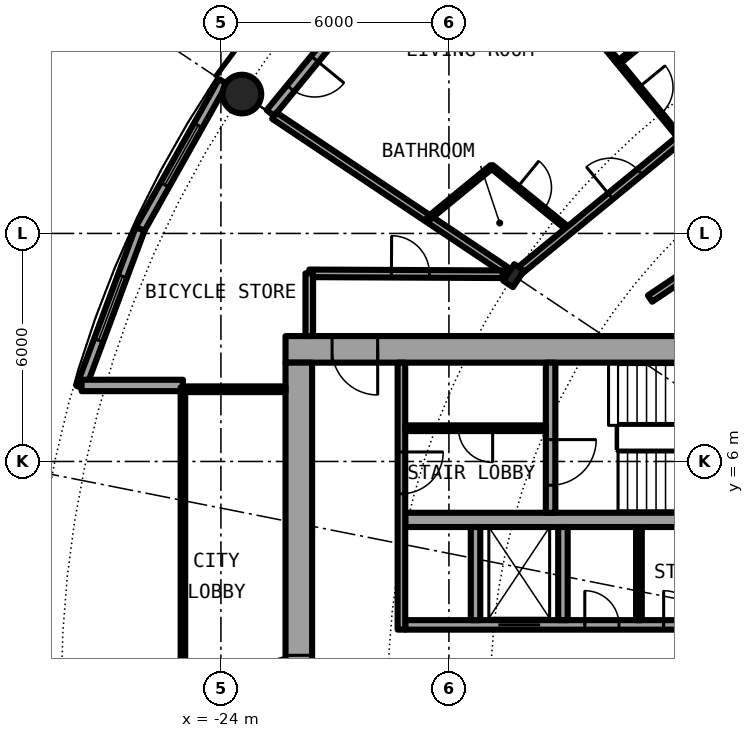
"""IFC4 building model, lengths in metres.
Left out: names, types, materials, properties, quantities, classifications, styles, units other than length and angle.
Written with IfcOpenShell. Run it as: python <this file> out.ifc"""

import sys

from ifc_helpers import new_model, si_unit, direction, frame, frame_2d, origin, origin_2d, place, context, subcontext, project, spatial, rectangle, hollow_circle, i_section, extrude, element, fill, save


model = new_model("IFC4")
c1 = context("Model", 3, precision=1e-05, world=origin(), true_north=direction((0.0, 1.0)))
c2 = subcontext(c1, "Body", "Model", "MODEL_VIEW")
j1 = project(units=[si_unit("LENGTHUNIT", "METRE"), si_unit("PLANEANGLEUNIT", "RADIAN")], contexts=[c1])
p1 = place(None, origin())
s1 = spatial("IfcSite", under=j1, at=p1, CompositionType="ELEMENT")
p2 = place(p1, origin())
s2 = spatial("IfcBuilding", under=s1, at=p2, CompositionType="ELEMENT")
p3 = place(p2, frame((0.0, 0.0, 91.05)))
s3 = spatial("IfcBuildingStorey", under=s2, at=p3, CompositionType="ELEMENT", Elevation=91.05)
p4 = place(p3, frame((-23.448, 15.667, 0.0), z_axis=(0.0, 0.0, 1.0), x_axis=(1.0, 0.0, 0.0)))
e1 = element("IfcColumn", 1, at=p4, inside=s3, PredefinedType="COLUMN", context=c2, shape_type="SweptSolid", body=[
    extrude(hollow_circle(Radius=0.508, WallThickness=0.04, at=origin_2d()), origin(), (0.0, 0.0, 1.0), 3.05),
])
p5 = place(p3, frame((-16.297, 10.889, 0.0), z_axis=(0.0, 0.0, 1.0), x_axis=(-0.831469612303, 0.55557023302, 0.0)))
e2 = element("IfcColumn", 2, at=p5, inside=s3, PredefinedType="COLUMN", context=c2, shape_type="SweptSolid", body=[
    extrude(i_section(OverallWidth=0.306, OverallDepth=0.524, WebThickness=0.021, FlangeThickness=0.04, FilletRadius=0.027, at=origin_2d()), origin(), (0.0, 0.0, 1.0), 3.05),
])
p6 = place(p3, frame((-19.304, 19.304, 0.0), z_axis=(0.0, 0.0, 1.0), x_axis=(-0.634382322723, -0.773019449054, 0.0)))
e3 = element("IfcWall", 3, at=p6, inside=s3, PredefinedType="SOLIDWALL", context=c2, shape_type="SweptSolid", body=[
    extrude(rectangle(XDim=5.352, YDim=0.25, at=frame_2d((2.676, 0.0))), origin(), (0.0, 0.0, 1.0), 2.7),
])
p7 = place(p6, frame((0.441, 0.0, 0.3)))
e4 = element("IfcOpeningElement", 4, at=p7, cuts=e3, PredefinedType="OPENING", context=c2, shape_type="SweptSolid", body=[
    extrude(rectangle(XDim=1.8, YDim=2.1, at=frame_2d((0.9, 1.05))), frame((0.0, 0.135, 0.0), z_axis=(0.0, -1.0, 0.0), x_axis=(1.0, 0.0, 0.0)), (0.0, 0.0, 1.0), 0.27),
])
p8 = place(p6, frame((3.51, 0.0, 0.0)))
e5 = element("IfcOpeningElement", 5, at=p8, cuts=e3, PredefinedType="OPENING", context=c2, shape_type="SweptSolid", body=[
    extrude(rectangle(XDim=1.0, YDim=2.2, at=frame_2d((0.5, 1.1))), frame((0.0, 0.135, 0.0), z_axis=(0.0, -1.0, 0.0), x_axis=(1.0, 0.0, 0.0)), (0.0, 0.0, 1.0), 0.27),
])
p9 = place(p3, frame((-23.946, 16.0, 0.0), z_axis=(0.0, 0.0, 1.0), x_axis=(-0.489696356642, -0.871893042919, 0.0)))
e6 = element("IfcWall", 6, at=p9, inside=s3, PredefinedType="SOLIDWALL", context=c2, shape_type="SweptSolid", body=[
    extrude(rectangle(XDim=4.454, YDim=0.25, at=frame_2d((2.227, 0.0))), origin(), (0.0, 0.0, 1.0), 2.7),
])
p10 = place(p9, frame((1.327, 0.0, 0.3)))
e7 = element("IfcOpeningElement", 7, at=p10, cuts=e6, PredefinedType="OPENING", context=c2, shape_type="SweptSolid", body=[
    extrude(rectangle(XDim=1.8, YDim=2.1, at=frame_2d((0.9, 1.05))), frame((0.0, 0.135, 0.0), z_axis=(0.0, -1.0, 0.0), x_axis=(1.0, 0.0, 0.0)), (0.0, 0.0, 1.0), 0.27),
])
p11 = place(p3, frame((-26.127, 12.117, 0.0), z_axis=(0.0, 0.0, 1.0), x_axis=(-0.349247811493, -0.937030397675, 0.0)))
e8 = element("IfcWall", 8, at=p11, inside=s3, PredefinedType="SOLIDWALL", context=c2, shape_type="SweptSolid", body=[
    extrude(rectangle(XDim=4.452, YDim=0.25, at=frame_2d((2.226, 0.0))), origin(), (0.0, 0.0, 1.0), 2.7),
])
p12 = place(p11, frame((1.327, 0.0, 0.3)))
e9 = element("IfcOpeningElement", 9, at=p12, cuts=e8, PredefinedType="OPENING", context=c2, shape_type="SweptSolid", body=[
    extrude(rectangle(XDim=1.8, YDim=2.1, at=frame_2d((0.9, 1.05))), frame((0.0, 0.135, 0.0), z_axis=(0.0, -1.0, 0.0), x_axis=(1.0, 0.0, 0.0)), (0.0, 0.0, 1.0), 0.27),
])
p13 = place(p3, frame((-25.0, 8.0, 0.0), z_axis=(0.0, 0.0, 1.0), x_axis=(-1.0, 0.0, 0.0)))
e10 = element("IfcWall", 10, at=p13, inside=s3, PredefinedType="SOLIDWALL", context=c2, shape_type="SweptSolid", body=[
    extrude(rectangle(XDim=2.667, YDim=0.3, at=frame_2d((1.333, 0.0))), origin(), (0.0, 0.0, 1.0), 2.7),
])
p14 = place(p3, frame((-8.3, 8.95, 0.0), z_axis=(0.0, 0.0, 1.0), x_axis=(-1.0, 0.0, 0.0)))
e11 = element("IfcWall", 11, at=p14, inside=s3, PredefinedType="SHEAR", context=c2, shape_type="SweptSolid", body=[
    extrude(rectangle(XDim=14.0, YDim=0.7, at=frame_2d((7.0, 0.0))), origin(), (0.0, 0.0, 1.0), 3.05),
])
p15 = place(p14, frame((11.575, 0.0, 0.0)))
e12 = element("IfcOpeningElement", 12, at=p15, cuts=e11, PredefinedType="OPENING", context=c2, shape_type="SweptSolid", body=[
    extrude(rectangle(XDim=1.2, YDim=2.3, at=frame_2d((0.6, 1.15))), frame((0.0, 0.36, 0.0), z_axis=(0.0, -1.0, 0.0), x_axis=(1.0, 0.0, 0.0)), (0.0, 0.0, 1.0), 0.72),
])
p16 = place(p3, frame((-21.95, -8.6, 0.0), z_axis=(0.0, 0.0, 1.0), x_axis=(0.0, 1.0, 0.0)))
e13 = element("IfcWall", 13, at=p16, inside=s3, PredefinedType="SHEAR", context=c2, shape_type="SweptSolid", body=[
    extrude(rectangle(XDim=17.2, YDim=0.7, at=frame_2d((8.6, 0.0))), origin(), (0.0, 0.0, 1.0), 3.05),
])
p17 = place(p16, frame((7.7, 0.0, 0.0)))
e14 = element("IfcOpeningElement", 14, at=p17, cuts=e13, PredefinedType="OPENING", context=c2, shape_type="SweptSolid", body=[
    extrude(rectangle(XDim=1.8, YDim=2.3, at=frame_2d((0.9, 1.15))), frame((0.0, 0.36, 0.0), z_axis=(0.0, -1.0, 0.0), x_axis=(1.0, 0.0, 0.0)), (0.0, 0.0, 1.0), 0.72),
])
p18 = place(p3, frame((-19.15, 1.7, 0.0), z_axis=(0.0, 0.0, 1.0), x_axis=(1.0, 0.0, 0.0)))
e15 = element("IfcWall", 15, at=p18, inside=s3, PredefinedType="SHEAR", context=c2, shape_type="SweptSolid", body=[
    extrude(rectangle(XDim=10.15, YDim=0.25, at=frame_2d((5.075, 0.0))), origin(), (0.0, 0.0, 1.0), 3.05),
])
p19 = place(p18, frame((2.45, 0.0, 0.0)))
e16 = element("IfcOpeningElement", 16, at=p19, cuts=e15, PredefinedType="OPENING", context=c2, shape_type="SweptSolid", body=[
    extrude(rectangle(XDim=1.1, YDim=2.3, at=frame_2d((0.55, 1.15))), frame((0.0, 0.135, 0.0), z_axis=(0.0, -1.0, 0.0), x_axis=(1.0, 0.0, 0.0)), (0.0, 0.0, 1.0), 0.27),
])
p20 = place(p18, frame((8.837, 0.0, 0.0)))
e17 = element("IfcOpeningElement", 17, at=p20, cuts=e15, PredefinedType="OPENING", context=c2, shape_type="SweptSolid", body=[
    extrude(rectangle(XDim=0.9, YDim=2.3, at=frame_2d((0.45, 1.15))), frame((0.0, 0.135, 0.0), z_axis=(0.0, -1.0, 0.0), x_axis=(1.0, 0.0, 0.0)), (0.0, 0.0, 1.0), 0.27),
])
p21 = place(p18, frame((6.8, 0.0, 0.0)))
e18 = element("IfcOpeningElement", 18, at=p21, cuts=e15, PredefinedType="OPENING", context=c2, shape_type="SweptSolid", body=[
    extrude(rectangle(XDim=0.9, YDim=2.3, at=frame_2d((0.45, 1.15))), frame((0.0, 0.135, 0.0), z_axis=(0.0, -1.0, 0.0), x_axis=(1.0, 0.0, 0.0)), (0.0, 0.0, 1.0), 0.27),
])
p22 = place(p18, frame((4.725, 0.0, 0.0)))
e19 = element("IfcOpeningElement", 19, at=p22, cuts=e15, PredefinedType="OPENING", context=c2, shape_type="SweptSolid", body=[
    extrude(rectangle(XDim=0.9, YDim=2.3, at=frame_2d((0.45, 1.15))), frame((0.0, 0.135, 0.0), z_axis=(0.0, -1.0, 0.0), x_axis=(1.0, 0.0, 0.0)), (0.0, 0.0, 1.0), 0.27),
])
p23 = place(p3, frame((-9.0, 4.462, 0.0), z_axis=(0.0, 0.0, 1.0), x_axis=(-1.0, 0.0, 0.0)))
e20 = element("IfcWall", 20, at=p23, inside=s3, PredefinedType="SHEAR", context=c2, shape_type="SweptSolid", body=[
    extrude(rectangle(XDim=10.15, YDim=0.375, at=frame_2d((5.075, 0.0))), origin(), (0.0, 0.0, 1.0), 3.05),
])
p24 = place(p3, frame((-15.325, 8.6, 0.0), z_axis=(0.0, 0.0, 1.0), x_axis=(0.0, -1.0, 0.0)))
e21 = element("IfcWall", 21, at=p24, inside=s3, PredefinedType="SHEAR", context=c2, shape_type="SweptSolid", body=[
    extrude(rectangle(XDim=3.95, YDim=0.25, at=frame_2d((1.975, 0.0))), origin(), (0.0, 0.0, 1.0), 3.05),
])
p25 = place(p24, frame((2.025, 0.0, 0.0)))
e22 = element("IfcOpeningElement", 22, at=p25, cuts=e21, PredefinedType="OPENING", context=c2, shape_type="SweptSolid", body=[
    extrude(rectangle(XDim=1.2, YDim=2.3, at=frame_2d((0.6, 1.15))), frame((0.0, 0.135, 0.0), z_axis=(0.0, -1.0, 0.0), x_axis=(1.0, 0.0, 0.0)), (0.0, 0.0, 1.0), 0.27),
])
for number, where, z_axis, x_axis in (
    (23, (-15.0, 1.825, 0.0), (0.0, 0.0, 1.0), (0.0, 1.0, 0.0)),
    (24, (-17.3, 1.825, 0.0), (0.0, 0.0, 1.0), (0.0, 1.0, 0.0)),
):
    element("IfcWall", number, at=place(p3, frame(where, z_axis=z_axis, x_axis=x_axis)), inside=s3, PredefinedType="SOLIDWALL", context=c2, shape_type="SweptSolid", body=[
        extrude(rectangle(XDim=2.45, YDim=0.25, at=frame_2d((1.225, 0.0))), origin(), (0.0, 0.0, 1.0), 2.7),
    ])
p26 = place(p3, frame((-19.25, 8.6, 0.0), z_axis=(0.0, 0.0, 1.0), x_axis=(0.0, -1.0, 0.0)))
e25 = element("IfcWall", 25, at=p26, inside=s3, PredefinedType="SOLIDWALL", context=c2, shape_type="SweptSolid", body=[
    extrude(rectangle(XDim=7.025, YDim=0.2, at=frame_2d((3.513, 0.0))), origin(), (0.0, 0.0, 1.0), 2.7),
])
p27 = place(p26, frame((2.35, 0.0, 0.0)))
e26 = element("IfcOpeningElement", 26, at=p27, cuts=e25, PredefinedType="OPENING", context=c2, shape_type="SweptSolid", body=[
    extrude(rectangle(XDim=1.1, YDim=2.3, at=frame_2d((0.55, 1.15))), frame((0.0, 0.11, 0.0), z_axis=(0.0, -1.0, 0.0), x_axis=(1.0, 0.0, 0.0)), (0.0, 0.0, 1.0), 0.22),
])
p28 = place(p3, frame((-13.0, 1.825, 0.0), z_axis=(0.0, 0.0, 1.0), x_axis=(0.0, 1.0, 0.0)))
e27 = element("IfcWall", 27, at=p28, inside=s3, PredefinedType="PARTITIONING", context=c2, shape_type="SweptSolid", body=[
    extrude(rectangle(XDim=2.45, YDim=0.15, at=frame_2d((1.225, 0.0))), origin(), (0.0, 0.0, 1.0), 2.7),
])
p29 = place(p3, frame((-15.45, 6.875, 0.0), z_axis=(0.0, 0.0, 1.0), x_axis=(-1.0, 0.0, 0.0)))
e28 = element("IfcWall", 28, at=p29, inside=s3, PredefinedType="PARTITIONING", context=c2, shape_type="SweptSolid", body=[
    extrude(rectangle(XDim=3.7, YDim=0.15, at=frame_2d((1.85, 0.0))), origin(), (0.0, 0.0, 1.0), 2.7),
])
p30 = place(p29, frame((1.4, 0.0, 0.0)))
e29 = element("IfcOpeningElement", 29, at=p30, cuts=e28, PredefinedType="OPENING", context=c2, shape_type="SweptSolid", body=[
    extrude(rectangle(XDim=0.9, YDim=2.3, at=frame_2d((0.45, 1.15))), frame((0.0, 0.085, 0.0), z_axis=(0.0, -1.0, 0.0), x_axis=(1.0, 0.0, 0.0)), (0.0, 0.0, 1.0), 0.17),
])
p31 = place(p3, frame((-22.3, 7.9, 0.0), z_axis=(0.0, 0.0, 1.0), x_axis=(-1.0, 0.0, 0.0)))
e30 = element("IfcWall", 30, at=p31, inside=s3, PredefinedType="PARTITIONING", context=c2, shape_type="SweptSolid", body=[
    extrude(rectangle(XDim=2.64, YDim=0.15, at=frame_2d((1.32, 0.0))), origin(), (0.0, 0.0, 1.0), 2.7),
])
p32 = place(p3, frame((-25.0, 7.95, 0.0), z_axis=(0.0, 0.0, 1.0), x_axis=(0.0, -1.0, 0.0)))
e31 = element("IfcWall", 31, at=p32, inside=s3, PredefinedType="PARTITIONING", context=c2, shape_type="SweptSolid", body=[
    extrude(rectangle(XDim=15.9, YDim=0.12, at=frame_2d((7.95, 0.0))), origin(), (0.0, 0.0, 1.0), 2.7),
])
p33 = place(p32, frame((0.95, 0.0, 0.1)))
e32 = element("IfcOpeningElement", 32, at=p33, cuts=e31, PredefinedType="OPENING", context=c2, shape_type="SweptSolid", body=[
    extrude(rectangle(XDim=14.0, YDim=2.35, at=frame_2d((7.0, 1.175))), frame((0.0, 0.07, 0.0), z_axis=(0.0, -1.0, 0.0), x_axis=(1.0, 0.0, 0.0)), (0.0, 0.0, 1.0), 0.14),
])
p34 = place(p3, frame((-22.595, 15.098, 0.0), z_axis=(0.0, 0.0, 1.0), x_axis=(0.831382022135, -0.555701298605, 0.0)))
e33 = element("IfcWall", 33, at=p34, inside=s3, PredefinedType="PARTITIONING", context=c2, shape_type="SweptSolid", body=[
    extrude(rectangle(XDim=7.313, YDim=0.2, at=frame_2d((3.657, 0.0))), origin(), (0.0, 0.0, 1.0), 2.7),
])
p35 = place(p3, frame((-17.24, 21.007, 0.0), z_axis=(0.0, 0.0, 1.0), x_axis=(0.634396151441, -0.77300810024, 0.0)))
e34 = element("IfcWall", 34, at=p35, inside=s3, PredefinedType="PARTITIONING", context=c2, shape_type="SweptSolid", body=[
    extrude(rectangle(XDim=8.419, YDim=0.1, at=frame_2d((4.209, 0.0))), origin(), (0.0, 0.0, 1.0), 2.7),
])
p36 = place(p35, frame((6.679, 0.0, 0.0)))
e35 = element("IfcOpeningElement", 35, at=p36, cuts=e34, PredefinedType="OPENING", context=c2, shape_type="SweptSolid", body=[
    extrude(rectangle(XDim=0.9, YDim=2.3, at=frame_2d((0.45, 1.15))), frame((0.0, 0.06, 0.0), z_axis=(0.0, -1.0, 0.0), x_axis=(1.0, 0.0, 0.0)), (0.0, 0.0, 1.0), 0.12),
])
p37 = place(p35, frame((2.468, 0.0, 0.0)))
e36 = element("IfcOpeningElement", 36, at=p37, cuts=e34, PredefinedType="OPENING", context=c2, shape_type="SweptSolid", body=[
    extrude(rectangle(XDim=0.9, YDim=2.3, at=frame_2d((0.45, 1.15))), frame((0.0, 0.06, 0.0), z_axis=(0.0, -1.0, 0.0), x_axis=(1.0, 0.0, 0.0)), (0.0, 0.0, 1.0), 0.12),
])
p38 = place(p3, frame((-16.874, 13.758, 0.0), z_axis=(0.0, 0.0, 1.0), x_axis=(0.774979608522, -0.631986239072, 0.0)))
e37 = element("IfcWall", 37, at=p38, inside=s3, PredefinedType="PARTITIONING", context=c2, shape_type="SweptSolid", body=[
    extrude(rectangle(XDim=2.636, YDim=0.1, at=frame_2d((1.318, 0.0))), origin(), (0.0, 0.0, 1.0), 2.7),
])
p39 = place(p38, frame((0.868, 0.0, 0.0)))
e38 = element("IfcOpeningElement", 38, at=p39, cuts=e37, PredefinedType="OPENING", context=c2, shape_type="SweptSolid", body=[
    extrude(rectangle(XDim=0.9, YDim=2.3, at=frame_2d((0.45, 1.15))), frame((0.0, 0.06, 0.0), z_axis=(0.0, -1.0, 0.0), x_axis=(1.0, 0.0, 0.0)), (0.0, 0.0, 1.0), 0.12),
])
p40 = place(p3, frame((-21.675, 10.95, 0.0), z_axis=(0.0, 0.0, 1.0), x_axis=(0.999988944514, -0.004702217579, 0.0)))
e39 = element("IfcWall", 39, at=p40, inside=s3, PredefinedType="PARTITIONING", context=c2, shape_type="SweptSolid", body=[
    extrude(rectangle(XDim=5.088, YDim=0.2, at=frame_2d((2.544, 0.0))), origin(), (0.0, 0.0, 1.0), 2.7),
])
p41 = place(p40, frame((2.162, 0.0, 0.0)))
e40 = element("IfcOpeningElement", 40, at=p41, cuts=e39, PredefinedType="OPENING", context=c2, shape_type="SweptSolid", body=[
    extrude(rectangle(XDim=1.0, YDim=2.3, at=frame_2d((0.5, 1.15))), frame((0.0, 0.11, 0.0), z_axis=(0.0, -1.0, 0.0), x_axis=(1.0, 0.0, 0.0)), (0.0, 0.0, 1.0), 0.22),
])
p42 = place(p3, frame((-12.708, 10.286, 0.0), z_axis=(0.0, 0.0, 1.0), x_axis=(0.831405725802, 0.555665834026, 0.0)))
e41 = element("IfcWall", 41, at=p42, inside=s3, PredefinedType="PARTITIONING", context=c2, shape_type="SweptSolid", body=[
    extrude(rectangle(XDim=11.314, YDim=0.2, at=frame_2d((5.657, 0.0))), origin(), (0.0, 0.0, 1.0), 2.7),
])
p43 = place(p42, frame((5.969, 0.0, 0.0)))
e42 = element("IfcOpeningElement", 42, at=p43, cuts=e41, PredefinedType="OPENING", context=c2, shape_type="SweptSolid", body=[
    extrude(rectangle(XDim=1.0, YDim=2.3, at=frame_2d((0.5, 1.15))), frame((0.0, 0.11, 0.0), z_axis=(0.0, -1.0, 0.0), x_axis=(1.0, 0.0, 0.0)), (0.0, 0.0, 1.0), 0.22),
])
p44 = place(p3, frame((-16.173, 10.991, 0.0), z_axis=(0.0, 0.0, 1.0), x_axis=(0.773049018445, 0.634346289562, 0.0)))
e43 = element("IfcWall", 43, at=p44, inside=s3, PredefinedType="PARTITIONING", context=c2, shape_type="SweptSolid", body=[
    extrude(rectangle(XDim=11.219, YDim=0.2, at=frame_2d((5.61, 0.0))), origin(), (0.0, 0.0, 1.0), 2.38),
])
p45 = place(p44, frame((3.135, 0.0, 0.0)))
e44 = element("IfcOpeningElement", 44, at=p45, cuts=e43, PredefinedType="OPENING", context=c2, shape_type="SweptSolid", body=[
    extrude(rectangle(XDim=1.0, YDim=2.3, at=frame_2d((0.5, 1.15))), frame((0.0, 0.11, 0.0), z_axis=(0.0, -1.0, 0.0), x_axis=(1.0, 0.0, 0.0)), (0.0, 0.0, 1.0), 0.22),
])
p46 = place(p3, frame((-18.542, 12.389, 0.0), z_axis=(0.0, 0.0, 1.0), x_axis=(0.772948171844, 0.634469166818, 0.0)))
e45 = element("IfcWall", 45, at=p46, inside=s3, PredefinedType="PARTITIONING", context=c2, shape_type="SweptSolid", body=[
    extrude(rectangle(XDim=2.158, YDim=0.1, at=frame_2d((1.079, 0.0))), origin(), (0.0, 0.0, 1.0), 2.7),
])
p47 = place(p3, frame((-13.538, 16.496, 0.0), z_axis=(0.0, 0.0, 1.0), x_axis=(0.773000340237, 0.634405606843, 0.0)))
e46 = element("IfcWall", 46, at=p47, inside=s3, PredefinedType="PARTITIONING", context=c2, shape_type="SweptSolid", body=[
    extrude(rectangle(XDim=6.474, YDim=0.1, at=frame_2d((3.237, 0.0))), origin(), (0.0, 0.0, 1.0), 2.7),
])
p48 = place(p3, frame((-21.675, 9.3, 0.0), z_axis=(0.0, 0.0, 1.0), x_axis=(0.0, 1.0, 0.0)))
e47 = element("IfcWall", 47, at=p48, inside=s3, PredefinedType="PARTITIONING", context=c2, shape_type="SweptSolid", body=[
    extrude(rectangle(XDim=1.65, YDim=0.2, at=frame_2d((0.825, 0.0))), origin(), (0.0, 0.0, 1.0), 2.7),
])
p49 = place(p8, origin())
e48 = element("IfcDoor", 48, at=p49, inside=s3, OperationType="SINGLE_SWING_LEFT", PredefinedType="DOOR", context=c2, shape_type="SweptSolid", body=[
    extrude(rectangle(XDim=1.0, YDim=2.2, at=frame_2d((0.5, 1.1))), frame((0.0, 0.025, 0.0), z_axis=(0.0, -1.0, 0.0), x_axis=(1.0, 0.0, 0.0)), (0.0, 0.0, 1.0), 0.05),
])
fill(e5, e48)
p50 = place(p10, origin())
e49 = element("IfcWindow", 49, at=p50, inside=s3, PartitioningType="SINGLE_PANEL", PredefinedType="WINDOW", context=c2, shape_type="SweptSolid", body=[
    extrude(rectangle(XDim=1.8, YDim=2.1, at=frame_2d((0.9, 1.05))), frame((0.0, 0.03, 0.0), z_axis=(0.0, -1.0, 0.0), x_axis=(1.0, 0.0, 0.0)), (0.0, 0.0, 1.0), 0.06),
])
fill(e7, e49)
p51 = place(p12, origin())
e50 = element("IfcWindow", 50, at=p51, inside=s3, PartitioningType="SINGLE_PANEL", PredefinedType="WINDOW", context=c2, shape_type="SweptSolid", body=[
    extrude(rectangle(XDim=1.8, YDim=2.1, at=frame_2d((0.9, 1.05))), frame((0.0, 0.03, 0.0), z_axis=(0.0, -1.0, 0.0), x_axis=(1.0, 0.0, 0.0)), (0.0, 0.0, 1.0), 0.06),
])
fill(e9, e50)
p52 = place(p19, origin())
e51 = element("IfcDoor", 51, at=p52, inside=s3, OperationType="DOUBLE_DOOR_SLIDING", PredefinedType="DOOR", context=c2, shape_type="SweptSolid", body=[
    extrude(rectangle(XDim=1.1, YDim=2.3, at=frame_2d((0.55, 1.15))), frame((0.0, 0.025, 0.0), z_axis=(0.0, -1.0, 0.0), x_axis=(1.0, 0.0, 0.0)), (0.0, 0.0, 1.0), 0.05),
])
fill(e16, e51)
p53 = place(p21, origin())
e52 = element("IfcDoor", 52, at=p53, inside=s3, OperationType="SINGLE_SWING_LEFT", PredefinedType="DOOR", context=c2, shape_type="SweptSolid", body=[
    extrude(rectangle(XDim=0.9, YDim=2.3, at=frame_2d((0.45, 1.15))), frame((0.0, 0.025, 0.0), z_axis=(0.0, -1.0, 0.0), x_axis=(1.0, 0.0, 0.0)), (0.0, 0.0, 1.0), 0.05),
])
fill(e18, e52)
p54 = place(p22, origin())
e53 = element("IfcDoor", 53, at=p54, inside=s3, OperationType="SINGLE_SWING_LEFT", PredefinedType="DOOR", context=c2, shape_type="SweptSolid", body=[
    extrude(rectangle(XDim=0.9, YDim=2.3, at=frame_2d((0.45, 1.15))), frame((0.0, 0.025, 0.0), z_axis=(0.0, -1.0, 0.0), x_axis=(1.0, 0.0, 0.0)), (0.0, 0.0, 1.0), 0.05),
])
fill(e19, e53)
p55 = place(p30, origin())
e54 = element("IfcDoor", 54, at=p55, inside=s3, OperationType="SINGLE_SWING_LEFT", PredefinedType="DOOR", context=c2, shape_type="SweptSolid", body=[
    extrude(rectangle(XDim=0.9, YDim=2.3, at=frame_2d((0.45, 1.15))), frame((0.0, 0.025, 0.0), z_axis=(0.0, -1.0, 0.0), x_axis=(1.0, 0.0, 0.0)), (0.0, 0.0, 1.0), 0.05),
])
fill(e29, e54)
p56 = place(p25, origin())
e55 = element("IfcDoor", 55, at=p56, inside=s3, OperationType="SINGLE_SWING_LEFT", PredefinedType="DOOR", context=c2, shape_type="SweptSolid", body=[
    extrude(rectangle(XDim=1.2, YDim=2.3, at=frame_2d((0.6, 1.15))), frame((0.0, 0.025, 0.0), z_axis=(0.0, -1.0, 0.0), x_axis=(1.0, 0.0, 0.0)), (0.0, 0.0, 1.0), 0.05),
])
fill(e22, e55)
p57 = place(p27, origin())
e56 = element("IfcDoor", 56, at=p57, inside=s3, OperationType="SINGLE_SWING_RIGHT", PredefinedType="DOOR", context=c2, shape_type="SweptSolid", body=[
    extrude(rectangle(XDim=1.1, YDim=2.3, at=frame_2d((0.55, 1.15))), frame((0.0, 0.025, 0.0), z_axis=(0.0, -1.0, 0.0), x_axis=(1.0, 0.0, 0.0)), (0.0, 0.0, 1.0), 0.05),
])
fill(e26, e56)
p58 = place(p15, origin())
e57 = element("IfcDoor", 57, at=p58, inside=s3, OperationType="SINGLE_SWING_LEFT", PredefinedType="DOOR", context=c2, shape_type="SweptSolid", body=[
    extrude(rectangle(XDim=1.2, YDim=2.3, at=frame_2d((0.6, 1.15))), frame((0.0, 0.025, 0.0), z_axis=(0.0, -1.0, 0.0), x_axis=(1.0, 0.0, 0.0)), (0.0, 0.0, 1.0), 0.05),
])
fill(e12, e57)
p59 = place(p17, origin())
e58 = element("IfcDoor", 58, at=p59, inside=s3, OperationType="SINGLE_SWING_LEFT", PredefinedType="DOOR", context=c2, shape_type="SweptSolid", body=[
    extrude(rectangle(XDim=1.8, YDim=2.3, at=frame_2d((0.9, 1.15))), frame((0.0, 0.025, 0.0), z_axis=(0.0, -1.0, 0.0), x_axis=(1.0, 0.0, 0.0)), (0.0, 0.0, 1.0), 0.05),
])
fill(e14, e58)
p60 = place(p33, origin())
e59 = element("IfcWindow", 59, at=p60, inside=s3, PartitioningType="SINGLE_PANEL", PredefinedType="WINDOW", context=c2, shape_type="SweptSolid", body=[
    extrude(rectangle(XDim=14.0, YDim=2.35, at=frame_2d((7.0, 1.175))), frame((0.0, 0.03, 0.0), z_axis=(0.0, -1.0, 0.0), x_axis=(1.0, 0.0, 0.0)), (0.0, 0.0, 1.0), 0.06),
])
fill(e32, e59)
p61 = place(p45, origin())
e60 = element("IfcDoor", 60, at=p61, inside=s3, OperationType="SINGLE_SWING_LEFT", PredefinedType="DOOR", context=c2, shape_type="SweptSolid", body=[
    extrude(rectangle(XDim=1.0, YDim=2.3, at=frame_2d((0.5, 1.15))), frame((0.0, 0.025, 0.0), z_axis=(0.0, -1.0, 0.0), x_axis=(1.0, 0.0, 0.0)), (0.0, 0.0, 1.0), 0.05),
])
fill(e44, e60)
p62 = place(p39, origin())
e61 = element("IfcDoor", 61, at=p62, inside=s3, OperationType="SINGLE_SWING_LEFT", PredefinedType="DOOR", context=c2, shape_type="SweptSolid", body=[
    extrude(rectangle(XDim=0.9, YDim=2.3, at=frame_2d((0.45, 1.15))), frame((0.0, 0.025, 0.0), z_axis=(0.0, -1.0, 0.0), x_axis=(1.0, 0.0, 0.0)), (0.0, 0.0, 1.0), 0.05),
])
fill(e38, e61)
p63 = place(p36, origin())
e62 = element("IfcDoor", 62, at=p63, inside=s3, OperationType="SINGLE_SWING_RIGHT", PredefinedType="DOOR", context=c2, shape_type="SweptSolid", body=[
    extrude(rectangle(XDim=0.9, YDim=2.3, at=frame_2d((0.45, 1.15))), frame((0.0, 0.025, 0.0), z_axis=(0.0, -1.0, 0.0), x_axis=(1.0, 0.0, 0.0)), (0.0, 0.0, 1.0), 0.05),
])
fill(e35, e62)
p64 = place(p41, origin())
e63 = element("IfcDoor", 63, at=p64, inside=s3, OperationType="SINGLE_SWING_RIGHT", PredefinedType="DOOR", context=c2, shape_type="SweptSolid", body=[
    extrude(rectangle(XDim=1.0, YDim=2.3, at=frame_2d((0.5, 1.15))), frame((0.0, 0.025, 0.0), z_axis=(0.0, -1.0, 0.0), x_axis=(1.0, 0.0, 0.0)), (0.0, 0.0, 1.0), 0.05),
])
fill(e40, e63)
save(model, sys.argv[1])
